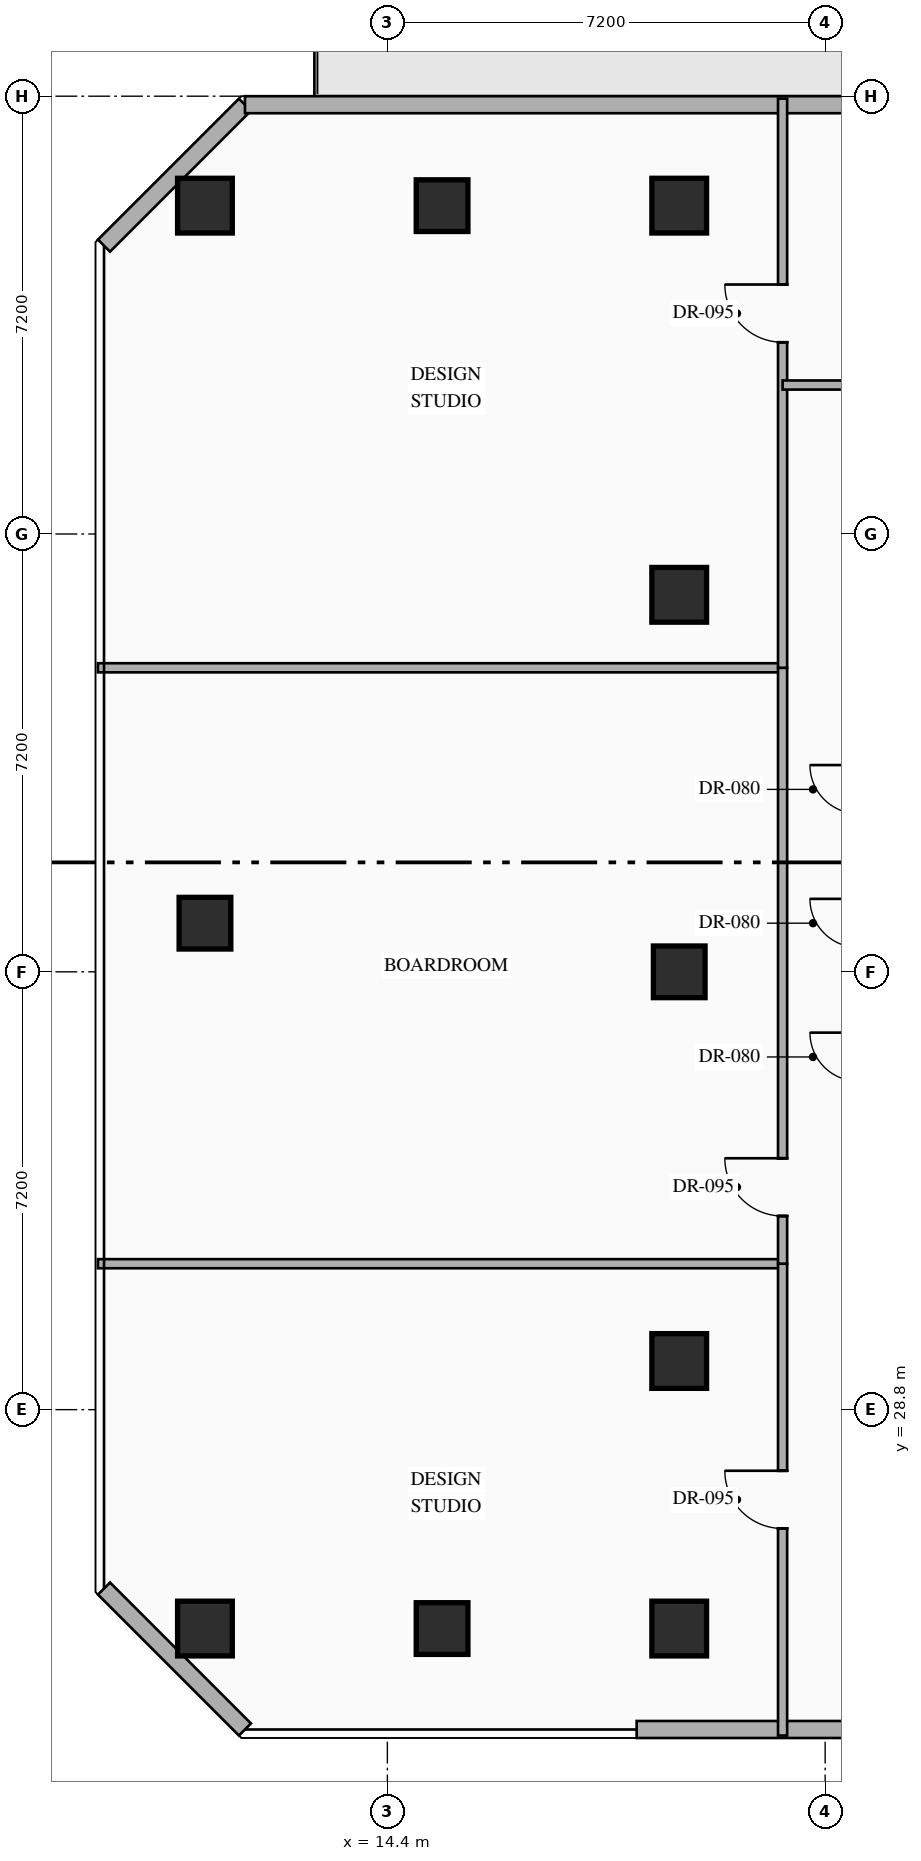
"""IFC4 building model, lengths in metres.
Left out: names, types, materials, properties, quantities, classifications, styles, units other than length and angle.
Written with IfcOpenShell. Run it as: python <this file> out.ifc"""

import sys

from ifc_helpers import new_model, si_unit, direction, frame, frame_2d, origin, origin_2d, place, context, subcontext, project, spatial, rectangle, hollow_rectangle, extrude, element, fill, save


model = new_model("IFC4")
c1 = context("Model", 3, precision=1e-05, world=origin(), true_north=direction((0.0, 1.0)))
c2 = subcontext(c1, "Body", "Model", "MODEL_VIEW")
j1 = project(units=[si_unit("LENGTHUNIT", "METRE"), si_unit("PLANEANGLEUNIT", "RADIAN")], contexts=[c1])
p1 = place(None, origin())
s1 = spatial("IfcSite", under=j1, at=p1, CompositionType="ELEMENT")
p2 = place(p1, origin())
s2 = spatial("IfcBuilding", under=s1, at=p2, CompositionType="ELEMENT")
p3 = place(p2, frame((0.0, 0.0, 108.45)))
s3 = spatial("IfcBuildingStorey", under=s2, at=p3, CompositionType="ELEMENT", Elevation=108.45)
for number, where, z_axis, x_axis in (
    (1, (11.4, 25.2, 0.0), (0.0, 0.0, 1.0), (1.0, 0.0, 0.0)),
    (2, (11.4, 48.6, 0.0), (0.0, 0.0, 1.0), (1.0, 0.0, 0.0)),
    (3, (19.2, 48.6, 0.0), (0.0, 0.0, 1.0), (1.0, 0.0, 0.0)),
    (4, (19.2, 25.2, 0.0), (0.0, 0.0, 1.0), (1.0, 0.0, 0.0)),
    (5, (19.2, 29.6, 0.0), (0.0, 0.0, 1.0), (1.0, 0.0, 0.0)),
    (6, (19.2, 42.2, 0.0), (0.0, 0.0, 1.0), (1.0, 0.0, 0.0)),
):
    element("IfcColumn", number, at=place(p3, frame(where, z_axis=z_axis, x_axis=x_axis)), inside=s3, PredefinedType="COLUMN", context=c2, shape_type="SweptSolid", body=[
        extrude(hollow_rectangle(XDim=0.9, YDim=0.9, WallThickness=0.036, at=origin_2d()), origin(), (0.0, 0.0, 1.0), 3.6),
    ])
for number, where, z_axis, x_axis in (
    (7, (11.4, 36.8, 0.0), (0.0, 0.0, 1.0), (1.0, 0.0, 0.0)),
    (8, (19.2, 36.0, 0.0), (0.0, 0.0, 1.0), (1.0, 0.0, 0.0)),
    (9, (15.3, 25.2, 0.0), (0.0, 0.0, 1.0), (1.0, 0.0, 0.0)),
    (10, (15.3, 48.6, 0.0), (0.0, 0.0, 1.0), (1.0, 0.0, 0.0)),
):
    element("IfcColumn", number, at=place(p3, frame(where, z_axis=z_axis, x_axis=x_axis)), inside=s3, PredefinedType="COLUMN", context=c2, shape_type="SweptSolid", body=[
        extrude(hollow_rectangle(XDim=0.85, YDim=0.85, WallThickness=0.032, at=origin_2d()), origin(), (0.0, 0.0, 1.0), 3.6),
    ])
p4 = place(p3, frame((25.247, 23.54, 0.0), z_axis=(0.0, 0.0, 1.0), x_axis=(-1.0, 0.0, 0.0)))
e11 = element("IfcWall", 11, at=p4, inside=s3, PredefinedType="STANDARD", context=c2, shape_type="SweptSolid", body=[
    extrude(rectangle(XDim=6.747, YDim=0.28, at=frame_2d((3.374, 0.0))), origin(), (0.0, 0.0, 1.0), 3.35),
])
p5 = place(p3, frame((12.058, 23.54, 0.0), z_axis=(0.0, 0.0, 1.0), x_axis=(-0.707144017911, 0.707069542501, 0.0)))
e12 = element("IfcWall", 12, at=p5, inside=s3, PredefinedType="STANDARD", context=c2, shape_type="SweptSolid", body=[
    extrude(rectangle(XDim=3.278, YDim=0.28, at=frame_2d((1.639, 0.0))), origin(), (0.0, 0.0, 1.0), 3.35),
])
p6 = place(p3, frame((9.74, 47.942, 0.0), z_axis=(0.0, 0.0, 1.0), x_axis=(0.707106781187, 0.707106781187, 0.0)))
e13 = element("IfcWall", 13, at=p6, inside=s3, PredefinedType="STANDARD", context=c2, shape_type="SweptSolid", body=[
    extrude(rectangle(XDim=3.278, YDim=0.28, at=frame_2d((1.639, 0.0))), origin(), (0.0, 0.0, 1.0), 3.35),
])
p7 = place(p3, frame((12.058, 50.26, 0.0), z_axis=(0.0, 0.0, 1.0), x_axis=(1.0, 0.0, 0.0)))
e14 = element("IfcWall", 14, at=p7, inside=s3, PredefinedType="STANDARD", context=c2, shape_type="SweptSolid", body=[
    extrude(rectangle(XDim=30.484, YDim=0.28, at=frame_2d((15.242, 0.0))), origin(), (0.0, 0.0, 1.0), 3.35),
])
p8 = place(p7, frame((14.992, 0.0, 0.0)))
e15 = element("IfcOpeningElement", 15, at=p8, cuts=e14, PredefinedType="OPENING", context=c2, shape_type="SweptSolid", body=[
    extrude(rectangle(XDim=1.1, YDim=2.2, at=frame_2d((0.55, 1.1))), frame((0.0, 0.15, 0.0), z_axis=(0.0, -1.0, 0.0), x_axis=(1.0, 0.0, 0.0)), (0.0, 0.0, 1.0), 0.3),
])
p9 = place(p7, frame((10.074, 0.0, 0.85)))
e16 = element("IfcOpeningElement", 16, at=p9, cuts=e14, PredefinedType="OPENING", context=c2, shape_type="SweptSolid", body=[
    extrude(rectangle(XDim=1.8, YDim=2.1, at=frame_2d((0.9, 1.05))), frame((0.0, 0.15, 0.0), z_axis=(0.0, -1.0, 0.0), x_axis=(1.0, 0.0, 0.0)), (0.0, 0.0, 1.0), 0.3),
])
p10 = place(p3, frame((9.64, 31.2, 0.0), z_axis=(0.0, 0.0, 1.0), x_axis=(1.0, 0.0, 0.0)))
e17 = element("IfcWall", 17, at=p10, inside=s3, PredefinedType="PARTITIONING", context=c2, shape_type="SweptSolid", body=[
    extrude(rectangle(XDim=11.26, YDim=0.15, at=frame_2d((5.63, 0.0))), origin(), (0.0, 0.0, 1.0), 3.35),
])
p11 = place(p3, frame((20.9, 23.44, 0.0), z_axis=(0.0, 0.0, 1.0), x_axis=(0.0, 1.0, 0.0)))
e18 = element("IfcWall", 18, at=p11, inside=s3, PredefinedType="PARTITIONING", context=c2, shape_type="SweptSolid", body=[
    extrude(rectangle(XDim=7.76, YDim=0.15, at=frame_2d((3.88, 0.0))), origin(), (0.0, 0.0, 1.0), 3.35),
])
p12 = place(p11, frame((3.405, 0.0, 0.0)))
e19 = element("IfcOpeningElement", 19, at=p12, cuts=e18, PredefinedType="OPENING", context=c2, shape_type="SweptSolid", body=[
    extrude(rectangle(XDim=0.95, YDim=2.15, at=frame_2d((0.475, 1.075))), frame((0.0, 0.085, 0.0), z_axis=(0.0, -1.0, 0.0), x_axis=(1.0, 0.0, 0.0)), (0.0, 0.0, 1.0), 0.17),
])
p13 = place(p3, frame((9.64, 41.0, 0.0), z_axis=(0.0, 0.0, 1.0), x_axis=(1.0, 0.0, 0.0)))
e20 = element("IfcWall", 20, at=p13, inside=s3, PredefinedType="PARTITIONING", context=c2, shape_type="SweptSolid", body=[
    extrude(rectangle(XDim=11.26, YDim=0.15, at=frame_2d((5.63, 0.0))), origin(), (0.0, 0.0, 1.0), 2.995),
])
p14 = place(p3, frame((20.9, 31.2, 0.0), z_axis=(0.0, 0.0, 1.0), x_axis=(0.0, 1.0, 0.0)))
e21 = element("IfcWall", 21, at=p14, inside=s3, PredefinedType="PARTITIONING", context=c2, shape_type="SweptSolid", body=[
    extrude(rectangle(XDim=9.8, YDim=0.15, at=frame_2d((4.9, 0.0))), origin(), (0.0, 0.0, 1.0), 3.35),
])
p15 = place(p14, frame((0.784, 0.0, 0.0)))
e22 = element("IfcOpeningElement", 22, at=p15, cuts=e21, PredefinedType="OPENING", context=c2, shape_type="SweptSolid", body=[
    extrude(rectangle(XDim=0.95, YDim=2.15, at=frame_2d((0.475, 1.075))), frame((0.0, 0.085, 0.0), z_axis=(0.0, -1.0, 0.0), x_axis=(1.0, 0.0, 0.0)), (0.0, 0.0, 1.0), 0.17),
])
p16 = place(p3, frame((20.9, 41.0, 0.0), z_axis=(0.0, 0.0, 1.0), x_axis=(0.0, 1.0, 0.0)))
e23 = element("IfcWall", 23, at=p16, inside=s3, PredefinedType="PARTITIONING", context=c2, shape_type="SweptSolid", body=[
    extrude(rectangle(XDim=9.36, YDim=0.15, at=frame_2d((4.68, 0.0))), origin(), (0.0, 0.0, 1.0), 3.35),
])
p17 = place(p16, frame((5.353, 0.0, 0.0)))
e24 = element("IfcOpeningElement", 24, at=p17, cuts=e23, PredefinedType="OPENING", context=c2, shape_type="SweptSolid", body=[
    extrude(rectangle(XDim=0.95, YDim=2.15, at=frame_2d((0.475, 1.075))), frame((0.0, 0.085, 0.0), z_axis=(0.0, -1.0, 0.0), x_axis=(1.0, 0.0, 0.0)), (0.0, 0.0, 1.0), 0.17),
])
p18 = place(p3, frame((20.9, 45.65, 0.0), z_axis=(0.0, 0.0, 1.0), x_axis=(1.0, 0.0, 0.0)))
e25 = element("IfcWall", 25, at=p18, inside=s3, PredefinedType="PARTITIONING", context=c2, shape_type="SweptSolid", body=[
    extrude(rectangle(XDim=10.9, YDim=0.15, at=frame_2d((5.45, 0.0))), origin(), (0.0, 0.0, 1.0), 2.695),
])
p19 = place(p18, frame((6.813, 0.0, 0.0)))
e26 = element("IfcOpeningElement", 26, at=p19, cuts=e25, PredefinedType="OPENING", context=c2, shape_type="SweptSolid", body=[
    extrude(rectangle(XDim=0.95, YDim=2.15, at=frame_2d((0.475, 1.075))), frame((0.0, 0.085, 0.0), z_axis=(0.0, -1.0, 0.0), x_axis=(1.0, 0.0, 0.0)), (0.0, 0.0, 1.0), 0.17),
])
p20 = place(p12, origin())
e27 = element("IfcDoor", 27, at=p20, inside=s3, OperationType="SINGLE_SWING_RIGHT", PredefinedType="DOOR", context=c2, shape_type="SweptSolid", body=[
    extrude(rectangle(XDim=0.95, YDim=2.15, at=frame_2d((0.475, 1.075))), frame((0.0, 0.025, 0.0), z_axis=(0.0, -1.0, 0.0), x_axis=(1.0, 0.0, 0.0)), (0.0, 0.0, 1.0), 0.05),
])
fill(e19, e27)
p21 = place(p15, origin())
e28 = element("IfcDoor", 28, at=p21, inside=s3, OperationType="SINGLE_SWING_RIGHT", PredefinedType="DOOR", context=c2, shape_type="SweptSolid", body=[
    extrude(rectangle(XDim=0.95, YDim=2.15, at=frame_2d((0.475, 1.075))), frame((0.0, 0.025, 0.0), z_axis=(0.0, -1.0, 0.0), x_axis=(1.0, 0.0, 0.0)), (0.0, 0.0, 1.0), 0.05),
])
fill(e22, e28)
p22 = place(p17, origin())
e29 = element("IfcDoor", 29, at=p22, inside=s3, OperationType="SINGLE_SWING_RIGHT", PredefinedType="DOOR", context=c2, shape_type="SweptSolid", body=[
    extrude(rectangle(XDim=0.95, YDim=2.15, at=frame_2d((0.475, 1.075))), frame((0.0, 0.025, 0.0), z_axis=(0.0, -1.0, 0.0), x_axis=(1.0, 0.0, 0.0)), (0.0, 0.0, 1.0), 0.05),
])
fill(e24, e29)
save(model, sys.argv[1])
